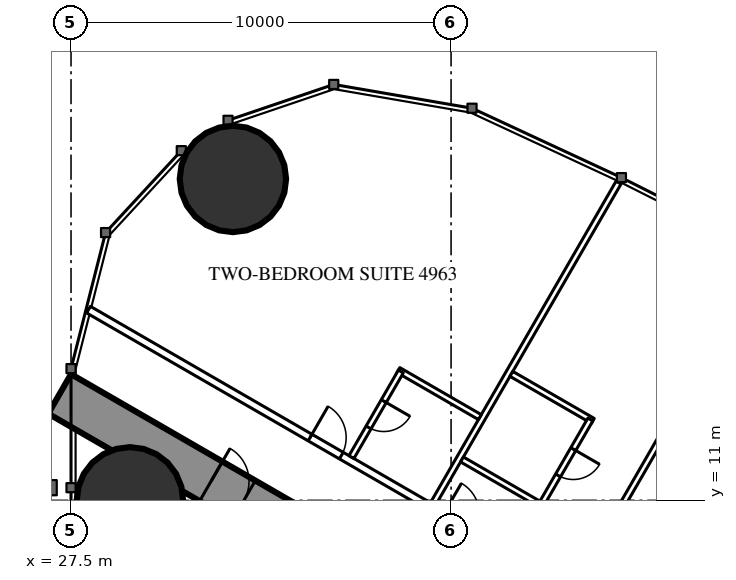
"""IFC4 building model, lengths in metres.
Left out: names, types, materials, properties, quantities, classifications, styles, units other than length and angle.
Written with IfcOpenShell. Run it as: python <this file> out.ifc"""

import sys

from ifc_helpers import new_model, si_unit, direction, frame, frame_2d, origin, origin_2d, place, context, subcontext, project, spatial, rectangle, circle, extrude, element, fill, save


model = new_model("IFC4")
c1 = context("Model", 3, precision=1e-05, world=origin(), true_north=direction((0.0, 1.0)))
c2 = subcontext(c1, "Body", "Model", "MODEL_VIEW")
j1 = project(units=[si_unit("LENGTHUNIT", "METRE"), si_unit("PLANEANGLEUNIT", "RADIAN")], contexts=[c1])
p1 = place(None, origin())
s1 = spatial("IfcSite", under=j1, at=p1, CompositionType="ELEMENT")
p2 = place(p1, origin())
s2 = spatial("IfcBuilding", under=s1, at=p2, CompositionType="ELEMENT")
p3 = place(p2, frame((0.0, 0.0, 184.3)))
s3 = spatial("IfcBuildingStorey", under=s2, at=p3, CompositionType="ELEMENT", Elevation=184.3)
for number, where, z_axis, x_axis in (
    (1, (31.76, 19.456, 0.0), (0.0, 0.0, 1.0), (1.0, 0.0, 0.0)),
    (2, (29.05, 11.0, 0.0), (0.0, 0.0, 1.0), (1.0, 0.0, 0.0)),
):
    element("IfcColumn", number, at=place(p3, frame(where, z_axis=z_axis, x_axis=x_axis)), inside=s3, PredefinedType="COLUMN", context=c2, shape_type="SweptSolid", body=[
        extrude(circle(Radius=1.4, at=origin_2d()), origin(), (0.0, 0.0, 1.0), 3.5),
    ])
p4 = place(p3, frame((27.2, 13.8, 0.0), z_axis=(0.0, 0.0, 1.0), x_axis=(0.866024515034, -0.500001539357, 0.0)))
e3 = element("IfcWall", 3, at=p4, inside=s3, PredefinedType="SHEAR", context=c2, shape_type="SweptSolid", body=[
    extrude(rectangle(XDim=26.907, YDim=1.2, at=frame_2d((13.454, 0.0))), origin(), (0.0, 0.0, 1.0), 3.5),
])
p5 = place(p4, frame((4.6, 0.0, 0.0)))
e4 = element("IfcOpeningElement", 4, at=p5, cuts=e3, PredefinedType="OPENING", context=c2, shape_type="SweptSolid", body=[
    extrude(rectangle(XDim=1.0, YDim=2.2, at=frame_2d((0.5, 1.1))), frame((0.0, 0.61, 0.0), z_axis=(0.0, -1.0, 0.0), x_axis=(1.0, 0.0, 0.0)), (0.0, 0.0, 1.0), 1.22),
])
p6 = place(p4, frame((13.395, 0.0, 0.0)))
e5 = element("IfcOpeningElement", 5, at=p6, cuts=e3, PredefinedType="OPENING", context=c2, shape_type="SweptSolid", body=[
    extrude(rectangle(XDim=1.8, YDim=2.2, at=frame_2d((0.9, 1.1))), frame((0.0, 0.61, 0.0), z_axis=(0.0, -1.0, 0.0), x_axis=(1.0, 0.0, 0.0)), (0.0, 0.0, 1.0), 1.22),
])
p7 = place(p3, frame((37.022, 10.9, 0.0), z_axis=(0.0, 0.0, 1.0), x_axis=(0.499998620953, 0.866026199976, 0.0)))
e6 = element("IfcWall", 6, at=p7, inside=s3, PredefinedType="PARTITIONING", context=c2, shape_type="SweptSolid", body=[
    extrude(rectangle(XDim=9.77, YDim=0.15, at=frame_2d((4.885, 0.0))), origin(), (0.0, 0.0, 1.0), 3.25),
])
p8 = place(p3, frame((40.769, 8.737, 0.0), z_axis=(0.0, 0.0, 1.0), x_axis=(0.500013115284, 0.866017831539, 0.0)))
e7 = element("IfcWall", 7, at=p8, inside=s3, PredefinedType="PARTITIONING", context=c2, shape_type="SweptSolid", body=[
    extrude(rectangle(XDim=7.198, YDim=0.15, at=frame_2d((3.599, 0.0))), origin(), (0.0, 0.0, 1.0), 2.3),
])
p9 = place(p3, frame((27.959, 16.017, 0.0), z_axis=(0.0, 0.0, 1.0), x_axis=(0.866027146794, -0.499996981007, 0.0)))
e8 = element("IfcWall", 8, at=p9, inside=s3, PredefinedType="PARTITIONING", context=c2, shape_type="SweptSolid", body=[
    extrude(rectangle(XDim=21.657, YDim=0.2, at=frame_2d((10.829, 0.0))), origin(), (0.0, 0.0, 1.0), 3.25),
])
p10 = place(p9, frame((17.741, 0.0, 0.0)))
e9 = element("IfcOpeningElement", 9, at=p10, cuts=e8, PredefinedType="OPENING", context=c2, shape_type="SweptSolid", body=[
    extrude(rectangle(XDim=0.95, YDim=2.2, at=frame_2d((0.475, 1.1))), frame((0.0, 0.11, 0.0), z_axis=(0.0, -1.0, 0.0), x_axis=(1.0, 0.0, 0.0)), (0.0, 0.0, 1.0), 0.22),
])
p11 = place(p9, frame((10.782, 0.0, 0.0)))
e10 = element("IfcOpeningElement", 10, at=p11, cuts=e8, PredefinedType="OPENING", context=c2, shape_type="SweptSolid", body=[
    extrude(rectangle(XDim=0.95, YDim=2.2, at=frame_2d((0.475, 1.1))), frame((0.0, 0.11, 0.0), z_axis=(0.0, -1.0, 0.0), x_axis=(1.0, 0.0, 0.0)), (0.0, 0.0, 1.0), 0.22),
])
p12 = place(p9, frame((6.732, 0.0, 0.0)))
e11 = element("IfcOpeningElement", 11, at=p12, cuts=e8, PredefinedType="OPENING", context=c2, shape_type="SweptSolid", body=[
    extrude(rectangle(XDim=0.95, YDim=2.2, at=frame_2d((0.475, 1.1))), frame((0.0, 0.11, 0.0), z_axis=(0.0, -1.0, 0.0), x_axis=(1.0, 0.0, 0.0)), (0.0, 0.0, 1.0), 0.22),
])
p13 = place(p9, frame((19.349, 0.0, 0.0)))
e12 = element("IfcOpeningElement", 12, at=p13, cuts=e8, PredefinedType="OPENING", context=c2, shape_type="SweptSolid", body=[
    extrude(rectangle(XDim=1.8, YDim=2.2, at=frame_2d((0.9, 1.1))), frame((0.0, 0.11, 0.0), z_axis=(0.0, -1.0, 0.0), x_axis=(1.0, 0.0, 0.0)), (0.0, 0.0, 1.0), 0.22),
])
p14 = place(p3, frame((39.087, 14.327, 0.0), z_axis=(0.0, 0.0, 1.0), x_axis=(0.866006523861, -0.500032699561, 0.0)))
e13 = element("IfcWall", 13, at=p14, inside=s3, PredefinedType="PARTITIONING", context=c2, shape_type="SweptSolid", body=[
    extrude(rectangle(XDim=2.475, YDim=0.15, at=frame_2d((1.237, 0.0))), origin(), (0.0, 0.0, 1.0), 3.25),
])
p15 = place(p3, frame((39.865, 10.875, 0.0), z_axis=(0.0, 0.0, 1.0), x_axis=(0.500047596559, 0.865997922154, 0.0)))
e14 = element("IfcWall", 14, at=p15, inside=s3, PredefinedType="PARTITIONING", context=c2, shape_type="SweptSolid", body=[
    extrude(rectangle(XDim=2.6, YDim=0.15, at=frame_2d((1.3, 0.0))), origin(), (0.0, 0.0, 1.0), 3.25),
])
p16 = place(p15, frame((0.9, 0.0, 0.0)))
e15 = element("IfcOpeningElement", 15, at=p16, cuts=e14, PredefinedType="OPENING", context=c2, shape_type="SweptSolid", body=[
    extrude(rectangle(XDim=0.8, YDim=2.2, at=frame_2d((0.4, 1.1))), frame((0.0, 0.085, 0.0), z_axis=(0.0, -1.0, 0.0), x_axis=(1.0, 0.0, 0.0)), (0.0, 0.0, 1.0), 0.17),
])
for number, where, z_axis, x_axis in (
    (16, (37.787, 12.075, 0.0), (0.0, 0.0, 1.0), (0.866, -0.5, 0.0)),
    (17, (36.114, 14.427, 0.0), (0.0, 0.0, 1.0), (0.866, -0.5, 0.0)),
):
    element("IfcWall", number, at=place(p3, frame(where, z_axis=z_axis, x_axis=x_axis)), inside=s3, PredefinedType="PARTITIONING", context=c2, shape_type="SweptSolid", body=[
        extrude(rectangle(XDim=2.475, YDim=0.15, at=frame_2d((1.237, 0.0))), origin(), (0.0, 0.0, 1.0), 3.25),
    ])
p17 = place(p3, frame((34.879, 12.138, 0.0), z_axis=(0.0, 0.0, 1.0), x_axis=(0.500006934395, 0.866021400173, 0.0)))
e18 = element("IfcWall", 18, at=p17, inside=s3, PredefinedType="PARTITIONING", context=c2, shape_type="SweptSolid", body=[
    extrude(rectangle(XDim=2.6, YDim=0.15, at=frame_2d((1.3, 0.0))), origin(), (0.0, 0.0, 1.0), 3.25),
])
p18 = place(p17, frame((0.9, 0.0, 0.0)))
e19 = element("IfcOpeningElement", 19, at=p18, cuts=e18, PredefinedType="OPENING", context=c2, shape_type="SweptSolid", body=[
    extrude(rectangle(XDim=0.8, YDim=2.2, at=frame_2d((0.4, 1.1))), frame((0.0, 0.085, 0.0), z_axis=(0.0, -1.0, 0.0), x_axis=(1.0, 0.0, 0.0)), (0.0, 0.0, 1.0), 0.17),
])
p19 = place(p16, origin())
e20 = element("IfcDoor", 20, at=p19, inside=s3, OperationType="SINGLE_SWING_RIGHT", PredefinedType="DOOR", context=c2, shape_type="SweptSolid", body=[
    extrude(rectangle(XDim=0.8, YDim=2.2, at=frame_2d((0.4, 1.1))), frame((0.0, 0.025, 0.0), z_axis=(0.0, -1.0, 0.0), x_axis=(1.0, 0.0, 0.0)), (0.0, 0.0, 1.0), 0.05),
])
fill(e15, e20)
p20 = place(p18, origin())
e21 = element("IfcDoor", 21, at=p20, inside=s3, OperationType="SINGLE_SWING_RIGHT", PredefinedType="DOOR", context=c2, shape_type="SweptSolid", body=[
    extrude(rectangle(XDim=0.8, YDim=2.2, at=frame_2d((0.4, 1.1))), frame((0.0, 0.025, 0.0), z_axis=(0.0, -1.0, 0.0), x_axis=(1.0, 0.0, 0.0)), (0.0, 0.0, 1.0), 0.05),
])
fill(e19, e21)
p21 = place(p12, origin())
e22 = element("IfcDoor", 22, at=p21, inside=s3, OperationType="SINGLE_SWING_LEFT", PredefinedType="DOOR", context=c2, shape_type="SweptSolid", body=[
    extrude(rectangle(XDim=0.95, YDim=2.2, at=frame_2d((0.475, 1.1))), frame((0.0, 0.025, 0.0), z_axis=(0.0, -1.0, 0.0), x_axis=(1.0, 0.0, 0.0)), (0.0, 0.0, 1.0), 0.05),
])
fill(e11, e22)
p22 = place(p5, origin())
e23 = element("IfcDoor", 23, at=p22, inside=s3, OperationType="SINGLE_SWING_LEFT", PredefinedType="DOOR", context=c2, shape_type="SweptSolid", body=[
    extrude(rectangle(XDim=1.0, YDim=2.2, at=frame_2d((0.5, 1.1))), frame((0.0, 0.025, 0.0), z_axis=(0.0, -1.0, 0.0), x_axis=(1.0, 0.0, 0.0)), (0.0, 0.0, 1.0), 0.05),
])
fill(e4, e23)
save(model, sys.argv[1])
